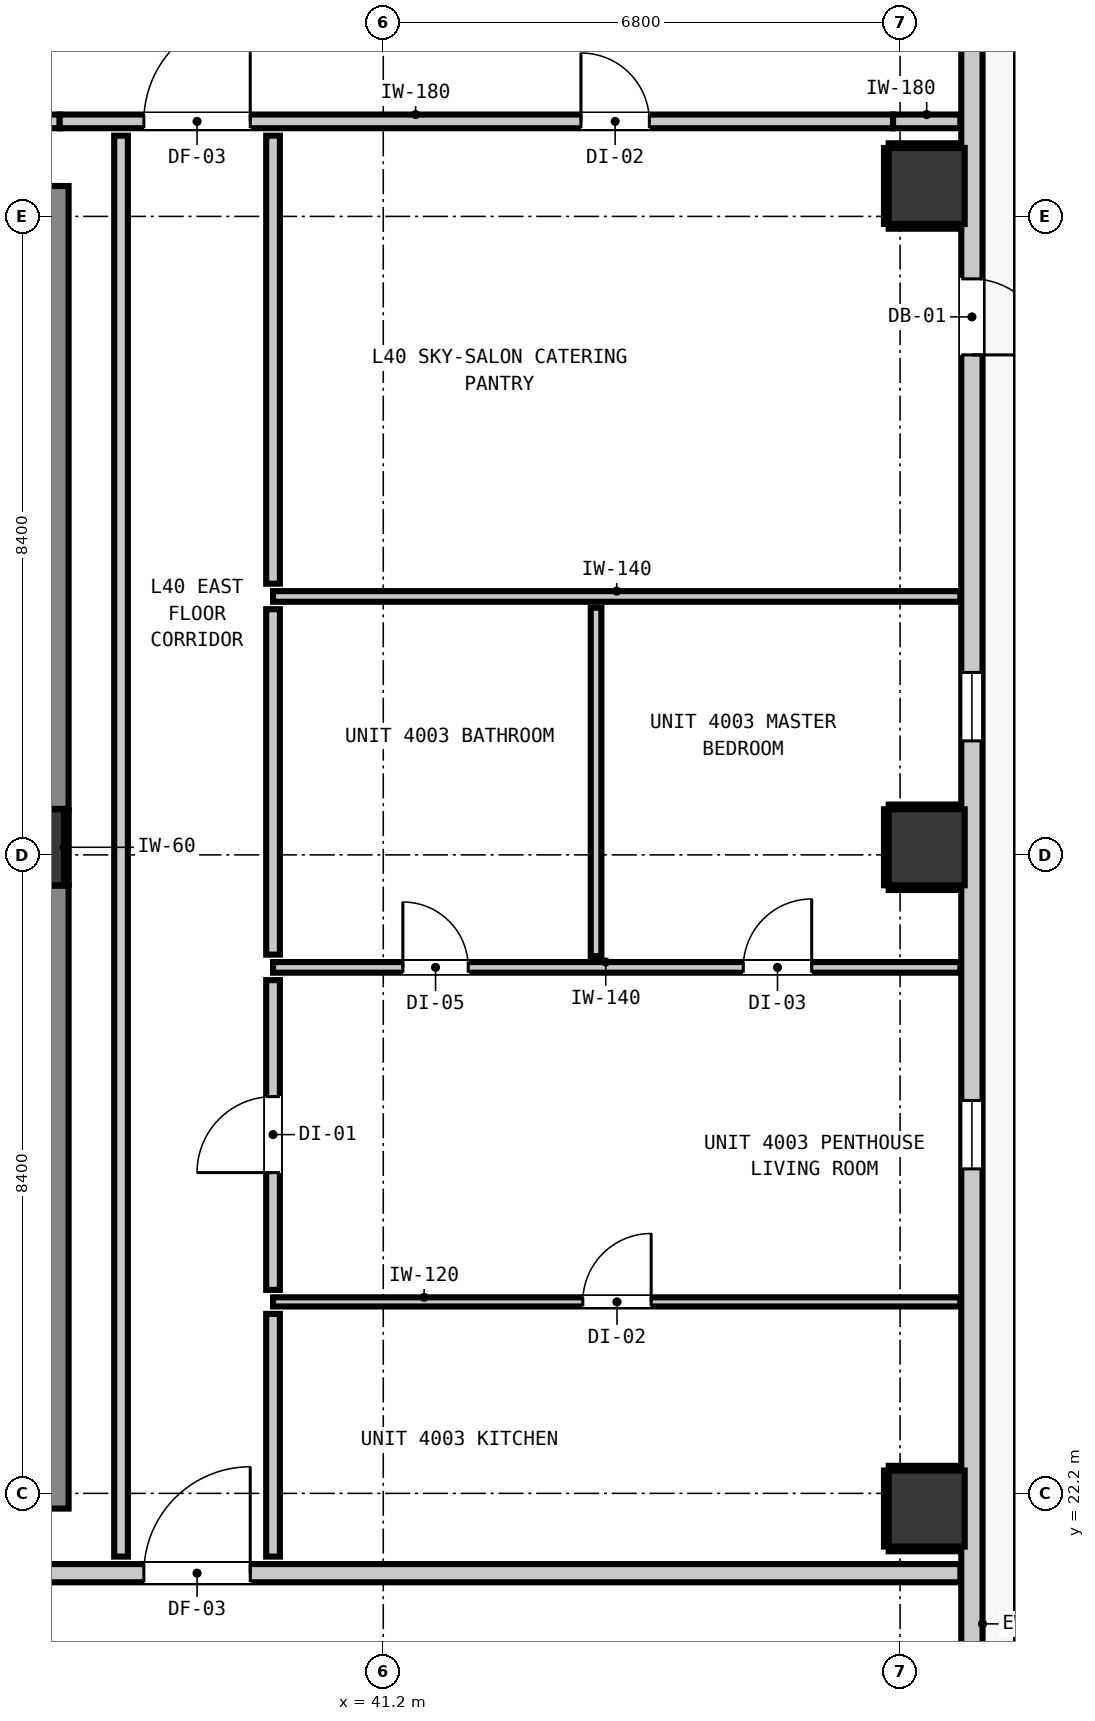
"""IFC4 building model, lengths in metres.
Left out: names, types, materials, properties, quantities, classifications, styles, units other than length and angle.
Written with IfcOpenShell. Run it as: python <this file> out.ifc"""

import sys

from ifc_helpers import new_model, si_unit, direction, frame, frame_2d, origin, origin_2d, place, context, subcontext, project, spatial, rectangle, extrude, element, fill, save


model = new_model("IFC4")
c1 = context("Model", 3, precision=1e-05, world=origin(), true_north=direction((0.0, 1.0)))
c2 = subcontext(c1, "Body", "Model", "MODEL_VIEW")
j1 = project(units=[si_unit("LENGTHUNIT", "METRE"), si_unit("PLANEANGLEUNIT", "RADIAN")], contexts=[c1])
p1 = place(None, origin())
s1 = spatial("IfcSite", under=j1, at=p1, CompositionType="ELEMENT")
p2 = place(p1, origin())
s2 = spatial("IfcBuilding", under=s1, at=p2, CompositionType="ELEMENT")
p3 = place(p2, frame((0.0, 0.0, 139.28)))
s3 = spatial("IfcBuildingStorey", under=s2, at=p3, CompositionType="ELEMENT", Elevation=139.28)
p4 = place(p3, frame((36.5, 30.7, 0.0), z_axis=(0.0, 0.0, 1.0), x_axis=(1.0, 0.0, 0.0)))
e1 = element("IfcColumn", 1, at=p4, inside=s3, PredefinedType="COLUMN", context=c2, shape_type="SweptSolid", body=[
    extrude(rectangle(XDim=1.0, YDim=1.0, at=origin_2d()), origin(), (0.0, 0.0, 1.0), 3.32),
])
p5 = place(p3, frame((36.56, 22.0, 0.0), z_axis=(0.0, 0.0, 1.0), x_axis=(0.0, 1.0, 0.0)))
e2 = element("IfcWall", 2, at=p5, inside=s3, PredefinedType="SHEAR", context=c2, shape_type="SweptSolid", body=[
    extrude(rectangle(XDim=8.195, YDim=1.0, at=frame_2d((4.098, 0.0))), origin(), (0.0, 0.0, 1.0), 3.32),
])
p6 = place(p3, frame((36.56, 31.205, 0.0), z_axis=(0.0, 0.0, 1.0), x_axis=(0.0, 1.0, 0.0)))
e3 = element("IfcWall", 3, at=p6, inside=s3, PredefinedType="SHEAR", context=c2, shape_type="SweptSolid", body=[
    extrude(rectangle(XDim=8.195, YDim=1.0, at=frame_2d((4.097, 0.0))), origin(), (0.0, 0.0, 1.0), 3.32),
])
for number, where, z_axis, x_axis in (
    (4, (48.35, 22.0, 0.0), (0.0, 0.0, 1.0), (1.0, 0.0, 0.0)),
    (5, (48.35, 30.7, 0.0), (0.0, 0.0, 1.0), (1.0, 0.0, 0.0)),
    (6, (48.35, 39.4, 0.0), (0.0, 0.0, 1.0), (1.0, 0.0, 0.0)),
):
    element("IfcColumn", number, at=place(p3, frame(where, z_axis=z_axis, x_axis=x_axis)), inside=s3, PredefinedType="COLUMN", context=c2, shape_type="SweptSolid", body=[
        extrude(rectangle(XDim=1.0, YDim=1.0, at=origin_2d()), origin(), (0.0, 0.0, 1.0), 3.32),
    ])
p7 = place(p3, frame((48.945, 43.645, 0.0), z_axis=(0.0, 0.0, 1.0), x_axis=(0.0, -1.0, 0.0)))
e7 = element("IfcWall", 7, at=p7, inside=s3, PredefinedType="STANDARD", context=c2, shape_type="SweptSolid", body=[
    extrude(rectangle(XDim=32.29, YDim=0.28, at=frame_2d((16.145, 0.0))), origin(), (0.0, 0.0, 1.0), 3.08),
])
p8 = place(p7, frame((5.467, 0.0, 0.0)))
e8 = element("IfcOpeningElement", 8, at=p8, cuts=e7, PredefinedType="OPENING", context=c2, shape_type="SweptSolid", body=[
    extrude(rectangle(XDim=1.0, YDim=2.15, at=frame_2d((0.5, 1.075))), frame((0.0, 0.15, 0.0), z_axis=(0.0, -1.0, 0.0), x_axis=(1.0, 0.0, 0.0)), (0.0, 0.0, 1.0), 0.3),
])
p9 = place(p7, frame((29.148, 0.0, 0.85)))
e9 = element("IfcOpeningElement", 9, at=p9, cuts=e7, PredefinedType="OPENING", context=c2, shape_type="SweptSolid", body=[
    extrude(rectangle(XDim=0.9, YDim=1.5, at=frame_2d((0.45, 0.75))), frame((0.0, 0.15, 0.0), z_axis=(0.0, -1.0, 0.0), x_axis=(1.0, 0.0, 0.0)), (0.0, 0.0, 1.0), 0.3),
])
p10 = place(p7, frame((0.393, 0.0, 0.85)))
e10 = element("IfcOpeningElement", 10, at=p10, cuts=e7, PredefinedType="OPENING", context=c2, shape_type="SweptSolid", body=[
    extrude(rectangle(XDim=0.9, YDim=1.5, at=frame_2d((0.45, 0.75))), frame((0.0, 0.15, 0.0), z_axis=(0.0, -1.0, 0.0), x_axis=(1.0, 0.0, 0.0)), (0.0, 0.0, 1.0), 0.3),
])
p11 = place(p7, frame((16.276, 0.0, 0.85)))
e11 = element("IfcOpeningElement", 11, at=p11, cuts=e7, PredefinedType="OPENING", context=c2, shape_type="SweptSolid", body=[
    extrude(rectangle(XDim=0.9, YDim=1.5, at=frame_2d((0.45, 0.75))), frame((0.0, 0.15, 0.0), z_axis=(0.0, -1.0, 0.0), x_axis=(1.0, 0.0, 0.0)), (0.0, 0.0, 1.0), 0.3),
])
p12 = place(p7, frame((10.645, 0.0, 0.85)))
e12 = element("IfcOpeningElement", 12, at=p12, cuts=e7, PredefinedType="OPENING", context=c2, shape_type="SweptSolid", body=[
    extrude(rectangle(XDim=0.9, YDim=1.5, at=frame_2d((0.45, 0.75))), frame((0.0, 0.15, 0.0), z_axis=(0.0, -1.0, 0.0), x_axis=(1.0, 0.0, 0.0)), (0.0, 0.0, 1.0), 0.3),
])
p13 = place(p3, frame((9.407, 21.15, 0.0), z_axis=(0.0, 0.0, 1.0), x_axis=(1.0, 0.0, 0.0)))
e13 = element("IfcWall", 13, at=p13, inside=s3, PredefinedType="PARTITIONING", context=c2, shape_type="SweptSolid", body=[
    extrude(rectangle(XDim=39.386, YDim=0.24, at=frame_2d((19.693, 0.0))), origin(), (0.0, 0.0, 1.0), 3.08),
])
p14 = place(p13, frame((8.803, 0.0, 0.0)))
e14 = element("IfcOpeningElement", 14, at=p14, cuts=e13, PredefinedType="OPENING", context=c2, shape_type="SweptSolid", body=[
    extrude(rectangle(XDim=1.1, YDim=2.15, at=frame_2d((0.55, 1.075))), frame((0.0, 0.13, 0.0), z_axis=(0.0, -1.0, 0.0), x_axis=(1.0, 0.0, 0.0)), (0.0, 0.0, 1.0), 0.26),
])
p15 = place(p13, frame((1.192, 0.0, 0.0)))
e15 = element("IfcOpeningElement", 15, at=p15, cuts=e13, PredefinedType="OPENING", context=c2, shape_type="SweptSolid", body=[
    extrude(rectangle(XDim=1.4, YDim=2.15, at=frame_2d((0.7, 1.075))), frame((0.0, 0.13, 0.0), z_axis=(0.0, -1.0, 0.0), x_axis=(1.0, 0.0, 0.0)), (0.0, 0.0, 1.0), 0.26),
])
p16 = place(p13, frame((28.643, 0.0, 0.0)))
e16 = element("IfcOpeningElement", 16, at=p16, cuts=e13, PredefinedType="OPENING", context=c2, shape_type="SweptSolid", body=[
    extrude(rectangle(XDim=1.4, YDim=2.15, at=frame_2d((0.7, 1.075))), frame((0.0, 0.13, 0.0), z_axis=(0.0, -1.0, 0.0), x_axis=(1.0, 0.0, 0.0)), (0.0, 0.0, 1.0), 0.26),
])
p17 = place(p3, frame((9.407, 40.25, 0.0), z_axis=(0.0, 0.0, 1.0), x_axis=(1.0, 0.0, 0.0)))
e17 = element("IfcWall", 17, at=p17, inside=s3, PredefinedType="PARTITIONING", context=c2, shape_type="SweptSolid", body=[
    extrude(rectangle(XDim=27.536, YDim=0.18, at=frame_2d((13.768, 0.0))), origin(), (0.0, 0.0, 1.0), 3.08),
])
p18 = place(p17, frame((8.028, 0.0, 0.0)))
e18 = element("IfcOpeningElement", 18, at=p18, cuts=e17, PredefinedType="OPENING", context=c2, shape_type="SweptSolid", body=[
    extrude(rectangle(XDim=1.4, YDim=2.15, at=frame_2d((0.7, 1.075))), frame((0.0, 0.1, 0.0), z_axis=(0.0, -1.0, 0.0), x_axis=(1.0, 0.0, 0.0)), (0.0, 0.0, 1.0), 0.2),
])
p19 = place(p17, frame((1.192, 0.0, 0.0)))
e19 = element("IfcOpeningElement", 19, at=p19, cuts=e17, PredefinedType="OPENING", context=c2, shape_type="SweptSolid", body=[
    extrude(rectangle(XDim=1.4, YDim=2.15, at=frame_2d((0.7, 1.075))), frame((0.0, 0.1, 0.0), z_axis=(0.0, -1.0, 0.0), x_axis=(1.0, 0.0, 0.0)), (0.0, 0.0, 1.0), 0.2),
])
p20 = place(p3, frame((36.943, 40.25, 0.0), z_axis=(0.0, 0.0, 1.0), x_axis=(1.0, 0.0, 0.0)))
e20 = element("IfcWall", 20, at=p20, inside=s3, PredefinedType="PARTITIONING", context=c2, shape_type="SweptSolid", body=[
    extrude(rectangle(XDim=10.964, YDim=0.18, at=frame_2d((5.482, 0.0))), origin(), (0.0, 0.0, 1.0), 2.565),
])
p21 = place(p20, frame((1.107, 0.0, 0.0)))
e21 = element("IfcOpeningElement", 21, at=p21, cuts=e20, PredefinedType="OPENING", context=c2, shape_type="SweptSolid", body=[
    extrude(rectangle(XDim=1.4, YDim=2.15, at=frame_2d((0.7, 1.075))), frame((0.0, 0.1, 0.0), z_axis=(0.0, -1.0, 0.0), x_axis=(1.0, 0.0, 0.0)), (0.0, 0.0, 1.0), 0.2),
])
p22 = place(p20, frame((6.858, 0.0, 0.0)))
e22 = element("IfcOpeningElement", 22, at=p22, cuts=e20, PredefinedType="OPENING", context=c2, shape_type="SweptSolid", body=[
    extrude(rectangle(XDim=0.9, YDim=2.1, at=frame_2d((0.45, 1.05))), frame((0.0, 0.1, 0.0), z_axis=(0.0, -1.0, 0.0), x_axis=(1.0, 0.0, 0.0)), (0.0, 0.0, 1.0), 0.2),
])
p23 = place(p3, frame((47.907, 40.25, 0.0), z_axis=(0.0, 0.0, 1.0), x_axis=(1.0, 0.0, 0.0)))
e23 = element("IfcWall", 23, at=p23, inside=s3, PredefinedType="PARTITIONING", context=c2, shape_type="SweptSolid", body=[
    extrude(rectangle(XDim=0.886, YDim=0.18, at=frame_2d((0.443, 0.0))), origin(), (0.0, 0.0, 1.0), 3.08),
])
p24 = place(p3, frame((39.75, 29.12, 0.0), z_axis=(0.0, 0.0, 1.0), x_axis=(1.0, 0.0, 0.0)))
e24 = element("IfcWall", 24, at=p24, inside=s3, PredefinedType="PARTITIONING", context=c2, shape_type="SweptSolid", body=[
    extrude(rectangle(XDim=9.043, YDim=0.14, at=frame_2d((4.521, 0.0))), origin(), (0.0, 0.0, 1.0), 3.08),
])
p25 = place(p24, frame((1.708, 0.0, 0.0)))
e25 = element("IfcOpeningElement", 25, at=p25, cuts=e24, PredefinedType="OPENING", context=c2, shape_type="SweptSolid", body=[
    extrude(rectangle(XDim=0.86, YDim=2.02, at=frame_2d((0.43, 1.01))), frame((0.0, 0.08, 0.0), z_axis=(0.0, -1.0, 0.0), x_axis=(1.0, 0.0, 0.0)), (0.0, 0.0, 1.0), 0.16),
])
p26 = place(p24, frame((6.187, 0.0, 0.0)))
e26 = element("IfcOpeningElement", 26, at=p26, cuts=e24, PredefinedType="OPENING", context=c2, shape_type="SweptSolid", body=[
    extrude(rectangle(XDim=0.9, YDim=2.1, at=frame_2d((0.45, 1.05))), frame((0.0, 0.08, 0.0), z_axis=(0.0, -1.0, 0.0), x_axis=(1.0, 0.0, 0.0)), (0.0, 0.0, 1.0), 0.16),
])
p27 = place(p3, frame((39.75, 34.0, 0.0), z_axis=(0.0, 0.0, 1.0), x_axis=(1.0, 0.0, 0.0)))
e27 = element("IfcWall", 27, at=p27, inside=s3, PredefinedType="PARTITIONING", context=c2, shape_type="SweptSolid", body=[
    extrude(rectangle(XDim=9.043, YDim=0.14, at=frame_2d((4.521, 0.0))), origin(), (0.0, 0.0, 1.0), 3.08),
])
p28 = place(p3, frame((39.75, 24.719, 0.0), z_axis=(0.0, 0.0, 1.0), x_axis=(1.0, 0.0, 0.0)))
e28 = element("IfcWall", 28, at=p28, inside=s3, PredefinedType="PARTITIONING", context=c2, shape_type="SweptSolid", body=[
    extrude(rectangle(XDim=9.043, YDim=0.12, at=frame_2d((4.521, 0.0))), origin(), (0.0, 0.0, 1.0), 3.08),
])
p29 = place(p28, frame((4.075, 0.0, 0.0)))
e29 = element("IfcOpeningElement", 29, at=p29, cuts=e28, PredefinedType="OPENING", context=c2, shape_type="SweptSolid", body=[
    extrude(rectangle(XDim=0.9, YDim=2.1, at=frame_2d((0.45, 1.05))), frame((0.0, 0.07, 0.0), z_axis=(0.0, -1.0, 0.0), x_axis=(1.0, 0.0, 0.0)), (0.0, 0.0, 1.0), 0.14),
])
p30 = place(p3, frame((37.75, 21.368, 0.0), z_axis=(0.0, 0.0, 1.0), x_axis=(0.0, 1.0, 0.0)))
e30 = element("IfcWall", 30, at=p30, inside=s3, PredefinedType="PARTITIONING", context=c2, shape_type="SweptSolid", body=[
    extrude(rectangle(XDim=18.694, YDim=0.18, at=frame_2d((9.347, 0.0))), origin(), (0.0, 0.0, 1.0), 3.08),
])
p31 = place(p3, frame((39.75, 21.368, 0.0), z_axis=(0.0, 0.0, 1.0), x_axis=(0.0, 1.0, 0.0)))
e31 = element("IfcWall", 31, at=p31, inside=s3, PredefinedType="PARTITIONING", context=c2, shape_type="SweptSolid", body=[
    extrude(rectangle(XDim=3.193, YDim=0.18, at=frame_2d((1.597, 0.0))), origin(), (0.0, 0.0, 1.0), 3.08),
])
p32 = place(p3, frame((39.75, 24.877, 0.0), z_axis=(0.0, 0.0, 1.0), x_axis=(0.0, 1.0, 0.0)))
e32 = element("IfcWall", 32, at=p32, inside=s3, PredefinedType="PARTITIONING", context=c2, shape_type="SweptSolid", body=[
    extrude(rectangle(XDim=4.075, YDim=0.18, at=frame_2d((2.038, 0.0))), origin(), (0.0, 0.0, 1.0), 3.08),
])
p33 = place(p32, frame((1.543, 0.0, 0.0)))
e33 = element("IfcOpeningElement", 33, at=p33, cuts=e32, PredefinedType="OPENING", context=c2, shape_type="SweptSolid", body=[
    extrude(rectangle(XDim=1.0, YDim=2.15, at=frame_2d((0.5, 1.075))), frame((0.0, 0.1, 0.0), z_axis=(0.0, -1.0, 0.0), x_axis=(1.0, 0.0, 0.0)), (0.0, 0.0, 1.0), 0.2),
])
p34 = place(p3, frame((39.75, 29.288, 0.0), z_axis=(0.0, 0.0, 1.0), x_axis=(0.0, 1.0, 0.0)))
e34 = element("IfcWall", 34, at=p34, inside=s3, PredefinedType="PARTITIONING", context=c2, shape_type="SweptSolid", body=[
    extrude(rectangle(XDim=4.544, YDim=0.18, at=frame_2d((2.272, 0.0))), origin(), (0.0, 0.0, 1.0), 3.08),
])
p35 = place(p3, frame((39.75, 34.168, 0.0), z_axis=(0.0, 0.0, 1.0), x_axis=(0.0, 1.0, 0.0)))
e35 = element("IfcWall", 35, at=p35, inside=s3, PredefinedType="PARTITIONING", context=c2, shape_type="SweptSolid", body=[
    extrude(rectangle(XDim=5.894, YDim=0.18, at=frame_2d((2.947, 0.0))), origin(), (0.0, 0.0, 1.0), 3.08),
])
p36 = place(p3, frame((44.0, 29.268, 0.0), z_axis=(0.0, 0.0, 1.0), x_axis=(0.0, 1.0, 0.0)))
e36 = element("IfcWall", 36, at=p36, inside=s3, PredefinedType="PARTITIONING", context=c2, shape_type="SweptSolid", body=[
    extrude(rectangle(XDim=4.584, YDim=0.14, at=frame_2d((2.292, 0.0))), origin(), (0.0, 0.0, 1.0), 3.08),
])
p37 = place(p3, frame((37.032, 30.21, 0.0), z_axis=(0.0, 0.0, 1.0), x_axis=(0.0, 1.0, 0.0)))
e37 = element("IfcWall", 37, at=p37, inside=s3, PredefinedType="PARTITIONING", context=c2, shape_type="SweptSolid", body=[
    extrude(rectangle(XDim=0.98, YDim=0.06, at=frame_2d((0.49, 0.0))), origin(), (0.0, 0.0, 1.0), 1.45),
])
for number, where, z_axis, x_axis in (
    (38, (47.85, 21.468, 0.0), (0.0, 0.0, 1.0), (1.0, 0.0, 0.0)),
    (39, (47.85, 22.532, 0.0), (0.0, 0.0, 1.0), (1.0, 0.0, 0.0)),
):
    element("IfcWall", number, at=place(p3, frame(where, z_axis=z_axis, x_axis=x_axis)), inside=s3, PredefinedType="PARTITIONING", context=c2, shape_type="SweptSolid", body=[
        extrude(rectangle(XDim=0.94, YDim=0.06, at=frame_2d((0.47, 0.0))), origin(), (0.0, 0.0, 1.0), 1.45),
    ])
p38 = place(p3, frame((47.818, 21.5, 0.0), z_axis=(0.0, 0.0, 1.0), x_axis=(0.0, 1.0, 0.0)))
e40 = element("IfcWall", 40, at=p38, inside=s3, PredefinedType="PARTITIONING", context=c2, shape_type="SweptSolid", body=[
    extrude(rectangle(XDim=1.0, YDim=0.06, at=frame_2d((0.5, 0.0))), origin(), (0.0, 0.0, 1.0), 1.45),
])
for number, where, z_axis, x_axis in (
    (41, (47.85, 30.168, 0.0), (0.0, 0.0, 1.0), (1.0, 0.0, 0.0)),
    (42, (47.85, 31.232, 0.0), (0.0, 0.0, 1.0), (1.0, 0.0, 0.0)),
):
    element("IfcWall", number, at=place(p3, frame(where, z_axis=z_axis, x_axis=x_axis)), inside=s3, PredefinedType="PARTITIONING", context=c2, shape_type="SweptSolid", body=[
        extrude(rectangle(XDim=0.94, YDim=0.06, at=frame_2d((0.47, 0.0))), origin(), (0.0, 0.0, 1.0), 1.45),
    ])
p39 = place(p3, frame((47.818, 30.2, 0.0), z_axis=(0.0, 0.0, 1.0), x_axis=(0.0, 1.0, 0.0)))
e43 = element("IfcWall", 43, at=p39, inside=s3, PredefinedType="PARTITIONING", context=c2, shape_type="SweptSolid", body=[
    extrude(rectangle(XDim=1.0, YDim=0.06, at=frame_2d((0.5, 0.0))), origin(), (0.0, 0.0, 1.0), 1.45),
])
for number, where, z_axis, x_axis in (
    (44, (47.85, 38.868, 0.0), (0.0, 0.0, 1.0), (1.0, 0.0, 0.0)),
    (45, (47.85, 39.932, 0.0), (0.0, 0.0, 1.0), (1.0, 0.0, 0.0)),
):
    element("IfcWall", number, at=place(p3, frame(where, z_axis=z_axis, x_axis=x_axis)), inside=s3, PredefinedType="PARTITIONING", context=c2, shape_type="SweptSolid", body=[
        extrude(rectangle(XDim=0.94, YDim=0.06, at=frame_2d((0.47, 0.0))), origin(), (0.0, 0.0, 1.0), 1.45),
    ])
p40 = place(p3, frame((47.818, 38.9, 0.0), z_axis=(0.0, 0.0, 1.0), x_axis=(0.0, 1.0, 0.0)))
e46 = element("IfcWall", 46, at=p40, inside=s3, PredefinedType="PARTITIONING", context=c2, shape_type="SweptSolid", body=[
    extrude(rectangle(XDim=1.0, YDim=0.06, at=frame_2d((0.5, 0.0))), origin(), (0.0, 0.0, 1.0), 1.45),
])
p41 = place(p8, origin())
e47 = element("IfcDoor", 47, at=p41, inside=s3, OperationType="SINGLE_SWING_RIGHT", PredefinedType="DOOR", context=c2, shape_type="SweptSolid", body=[
    extrude(rectangle(XDim=1.0, YDim=2.15, at=frame_2d((0.5, 1.075))), frame((0.0, 0.025, 0.0), z_axis=(0.0, -1.0, 0.0), x_axis=(1.0, 0.0, 0.0)), (0.0, 0.0, 1.0), 0.05),
])
fill(e8, e47)
p42 = place(p11, origin())
e48 = element("IfcWindow", 48, at=p42, inside=s3, PartitioningType="SINGLE_PANEL", PredefinedType="WINDOW", context=c2, shape_type="SweptSolid", body=[
    extrude(rectangle(XDim=0.9, YDim=1.5, at=frame_2d((0.45, 0.75))), frame((0.0, 0.03, 0.0), z_axis=(0.0, -1.0, 0.0), x_axis=(1.0, 0.0, 0.0)), (0.0, 0.0, 1.0), 0.06),
])
fill(e11, e48)
p43 = place(p12, origin())
e49 = element("IfcWindow", 49, at=p43, inside=s3, PartitioningType="SINGLE_PANEL", PredefinedType="WINDOW", context=c2, shape_type="SweptSolid", body=[
    extrude(rectangle(XDim=0.9, YDim=1.5, at=frame_2d((0.45, 0.75))), frame((0.0, 0.03, 0.0), z_axis=(0.0, -1.0, 0.0), x_axis=(1.0, 0.0, 0.0)), (0.0, 0.0, 1.0), 0.06),
])
fill(e12, e49)
p44 = place(p16, origin())
e50 = element("IfcDoor", 50, at=p44, inside=s3, OperationType="SINGLE_SWING_RIGHT", PredefinedType="DOOR", context=c2, shape_type="SweptSolid", body=[
    extrude(rectangle(XDim=1.4, YDim=2.15, at=frame_2d((0.7, 1.075))), frame((0.0, 0.025, 0.0), z_axis=(0.0, -1.0, 0.0), x_axis=(1.0, 0.0, 0.0)), (0.0, 0.0, 1.0), 0.05),
])
fill(e16, e50)
p45 = place(p21, origin())
e51 = element("IfcDoor", 51, at=p45, inside=s3, OperationType="SINGLE_SWING_RIGHT", PredefinedType="DOOR", context=c2, shape_type="SweptSolid", body=[
    extrude(rectangle(XDim=1.4, YDim=2.15, at=frame_2d((0.7, 1.075))), frame((0.0, 0.025, 0.0), z_axis=(0.0, -1.0, 0.0), x_axis=(1.0, 0.0, 0.0)), (0.0, 0.0, 1.0), 0.05),
])
fill(e21, e51)
p46 = place(p33, origin())
e52 = element("IfcDoor", 52, at=p46, inside=s3, OperationType="SINGLE_SWING_LEFT", PredefinedType="DOOR", context=c2, shape_type="SweptSolid", body=[
    extrude(rectangle(XDim=1.0, YDim=2.15, at=frame_2d((0.5, 1.075))), frame((0.0, 0.025, 0.0), z_axis=(0.0, -1.0, 0.0), x_axis=(1.0, 0.0, 0.0)), (0.0, 0.0, 1.0), 0.05),
])
fill(e33, e52)
p47 = place(p29, origin())
e53 = element("IfcDoor", 53, at=p47, inside=s3, OperationType="SINGLE_SWING_RIGHT", PredefinedType="DOOR", context=c2, shape_type="SweptSolid", body=[
    extrude(rectangle(XDim=0.9, YDim=2.1, at=frame_2d((0.45, 1.05))), frame((0.0, 0.025, 0.0), z_axis=(0.0, -1.0, 0.0), x_axis=(1.0, 0.0, 0.0)), (0.0, 0.0, 1.0), 0.05),
])
fill(e29, e53)
p48 = place(p25, origin())
e54 = element("IfcDoor", 54, at=p48, inside=s3, OperationType="SINGLE_SWING_LEFT", PredefinedType="DOOR", context=c2, shape_type="SweptSolid", body=[
    extrude(rectangle(XDim=0.86, YDim=2.02, at=frame_2d((0.43, 1.01))), frame((0.0, 0.025, 0.0), z_axis=(0.0, -1.0, 0.0), x_axis=(1.0, 0.0, 0.0)), (0.0, 0.0, 1.0), 0.05),
])
fill(e25, e54)
p49 = place(p26, origin())
e55 = element("IfcDoor", 55, at=p49, inside=s3, OperationType="SINGLE_SWING_RIGHT", PredefinedType="DOOR", context=c2, shape_type="SweptSolid", body=[
    extrude(rectangle(XDim=0.9, YDim=2.1, at=frame_2d((0.45, 1.05))), frame((0.0, 0.025, 0.0), z_axis=(0.0, -1.0, 0.0), x_axis=(1.0, 0.0, 0.0)), (0.0, 0.0, 1.0), 0.05),
])
fill(e26, e55)
p50 = place(p22, origin())
e56 = element("IfcDoor", 56, at=p50, inside=s3, OperationType="SINGLE_SWING_LEFT", PredefinedType="DOOR", context=c2, shape_type="SweptSolid", body=[
    extrude(rectangle(XDim=0.9, YDim=2.1, at=frame_2d((0.45, 1.05))), frame((0.0, 0.025, 0.0), z_axis=(0.0, -1.0, 0.0), x_axis=(1.0, 0.0, 0.0)), (0.0, 0.0, 1.0), 0.05),
])
fill(e22, e56)
save(model, sys.argv[1])
